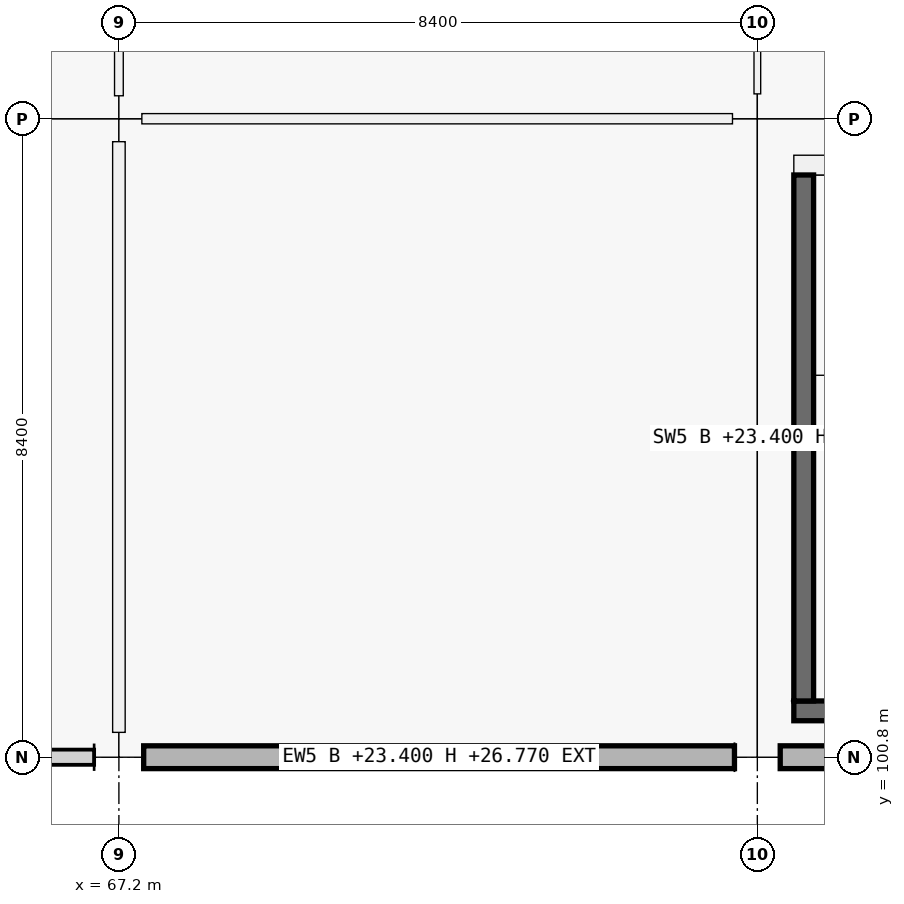
"""IFC4 building model, lengths in metres.
Left out: names, types, materials, properties, quantities, classifications, styles, units other than length and angle.
Written with IfcOpenShell. Run it as: python <this file> out.ifc"""

import sys

from ifc_helpers import new_model, si_unit, direction, frame, frame_2d, origin, origin_2d, place, context, subcontext, project, spatial, rectangle, extrude, element, fill, save


model = new_model("IFC4")
c1 = context("Model", 3, precision=1e-05, world=origin(), true_north=direction((0.0, 1.0)))
c2 = subcontext(c1, "Body", "Model", "MODEL_VIEW")
j1 = project(units=[si_unit("LENGTHUNIT", "METRE"), si_unit("PLANEANGLEUNIT", "RADIAN")], contexts=[c1])
p1 = place(None, origin())
s1 = spatial("IfcSite", under=j1, at=p1, CompositionType="ELEMENT")
p2 = place(p1, origin())
s2 = spatial("IfcBuilding", under=s1, at=p2, CompositionType="ELEMENT")
p3 = place(p2, frame((0.0, 0.0, 23.4)))
s3 = spatial("IfcBuildingStorey", under=s2, at=p3, CompositionType="ELEMENT", Elevation=23.4)
p4 = place(p3, frame((67.2, 100.8, 0.0), z_axis=(0.0, 0.0, 1.0), x_axis=(1.0, 0.0, 0.0)))
e1 = element("IfcColumn", 1, at=p4, inside=s3, PredefinedType="COLUMN", context=c2, shape_type="SweptSolid", body=[
    extrude(rectangle(XDim=0.65, YDim=0.65, at=origin_2d()), origin(), (0.0, 0.0, 1.0), 4.32),
])
for number, where, z_axis, x_axis in (
    (2, (67.2, 109.2, 0.0), (0.0, 0.0, 1.0), (1.0, 0.0, 0.0)),
    (3, (75.6, 100.8, 0.0), (0.0, 0.0, 1.0), (1.0, 0.0, 0.0)),
):
    element("IfcColumn", number, at=place(p3, frame(where, z_axis=z_axis, x_axis=x_axis)), inside=s3, PredefinedType="COLUMN", context=c2, shape_type="SweptSolid", body=[
        extrude(rectangle(XDim=0.6, YDim=0.6, at=origin_2d()), origin(), (0.0, 0.0, 1.0), 4.32),
    ])
p5 = place(p3, frame((75.6, 109.2, 0.0), z_axis=(0.0, 0.0, 1.0), x_axis=(1.0, 0.0, 0.0)))
e4 = element("IfcColumn", 4, at=p5, inside=s3, PredefinedType="COLUMN", context=c2, shape_type="SweptSolid", body=[
    extrude(rectangle(XDim=0.65, YDim=0.65, at=origin_2d()), origin(), (0.0, 0.0, 1.0), 4.32),
])
p6 = place(p3, frame((75.299, 100.8, 0.0), z_axis=(0.0, 0.0, 1.0), x_axis=(-1.0, 0.0, 0.0)))
e5 = element("IfcWall", 5, at=p6, inside=s3, PredefinedType="SOLIDWALL", context=c2, shape_type="SweptSolid", body=[
    extrude(rectangle(XDim=7.773, YDim=0.3, at=frame_2d((3.887, 0.0))), origin(), (0.0, 0.0, 1.0), 3.37),
])
p7 = place(p6, frame((2.511, 0.0, 0.9)))
e6 = element("IfcOpeningElement", 6, at=p7, cuts=e5, PredefinedType="OPENING", context=c2, shape_type="SweptSolid", body=[
    extrude(rectangle(XDim=2.75, YDim=1.6, at=frame_2d((1.375, 0.8))), frame((0.0, 0.15, 0.0), z_axis=(0.0, -1.0, 0.0), x_axis=(1.0, 0.0, 0.0)), (0.0, 0.0, 1.0), 0.3),
])
p8 = place(p3, frame((83.674, 100.8, 0.0), z_axis=(0.0, 0.0, 1.0), x_axis=(-1.0, 0.0, 0.0)))
e7 = element("IfcWall", 7, at=p8, inside=s3, PredefinedType="SOLIDWALL", context=c2, shape_type="SweptSolid", body=[
    extrude(rectangle(XDim=7.773, YDim=0.3, at=frame_2d((3.887, 0.0))), origin(), (0.0, 0.0, 1.0), 3.37),
])
p9 = place(p3, frame((83.52, 101.41, 0.0), z_axis=(0.0, 0.0, 1.0), x_axis=(-1.0, 0.0, 0.0)))
e8 = element("IfcWall", 8, at=p9, inside=s3, PredefinedType="SHEAR", context=c2, shape_type="SweptSolid", body=[
    extrude(rectangle(XDim=7.44, YDim=0.26, at=frame_2d((3.72, 0.0))), origin(), (0.0, 0.0, 1.0), 4.32),
])
p10 = place(p3, frame((76.21, 101.54, 0.0), z_axis=(0.0, 0.0, 1.0), x_axis=(0.0, 1.0, 0.0)))
e9 = element("IfcWall", 9, at=p10, inside=s3, PredefinedType="SHEAR", context=c2, shape_type="SweptSolid", body=[
    extrude(rectangle(XDim=6.92, YDim=0.26, at=frame_2d((3.46, 0.0))), origin(), (0.0, 0.0, 1.0), 4.32),
])
p11 = place(p3, frame((76.08, 108.59, 0.0), z_axis=(0.0, 0.0, 1.0), x_axis=(1.0, 0.0, 0.0)))
e10 = element("IfcWall", 10, at=p11, inside=s3, PredefinedType="SHEAR", context=c2, shape_type="SweptSolid", body=[
    extrude(rectangle(XDim=7.44, YDim=0.26, at=frame_2d((3.72, 0.0))), origin(), (0.0, 0.0, 1.0), 4.32),
])
p12 = place(p3, frame((67.502, 109.2, 0.0), z_axis=(0.0, 0.0, 1.0), x_axis=(1.0, 0.0, 0.0)))
e11 = element("IfcWall", 11, at=p12, inside=s3, PredefinedType="PARTITIONING", context=c2, shape_type="SweptSolid", body=[
    extrude(rectangle(XDim=7.771, YDim=0.135, at=frame_2d((3.885, 0.0))), origin(), (0.0, 0.0, 1.0), 3.19),
])
p13 = place(p3, frame((67.2, 101.127, 0.0), z_axis=(0.0, 0.0, 1.0), x_axis=(0.0, 1.0, 0.0)))
e12 = element("IfcWall", 12, at=p13, inside=s3, PredefinedType="PARTITIONING", context=c2, shape_type="SweptSolid", body=[
    extrude(rectangle(XDim=7.771, YDim=0.165, at=frame_2d((3.885, 0.0))), origin(), (0.0, 0.0, 1.0), 3.19),
])
p14 = place(p13, frame((3.415, 0.0, 0.0)))
e13 = element("IfcOpeningElement", 13, at=p14, cuts=e12, PredefinedType="OPENING", context=c2, shape_type="SweptSolid", body=[
    extrude(rectangle(XDim=0.94, YDim=2.15, at=frame_2d((0.47, 1.075))), frame((0.0, 0.083, 0.0), z_axis=(0.0, -1.0, 0.0), x_axis=(1.0, 0.0, 0.0)), (0.0, 0.0, 1.0), 0.165),
])
p15 = place(p3, frame((67.2, 109.502, 0.0), z_axis=(0.0, 0.0, 1.0), x_axis=(0.0, 1.0, 0.0)))
e14 = element("IfcWall", 14, at=p15, inside=s3, PredefinedType="PARTITIONING", context=c2, shape_type="SweptSolid", body=[
    extrude(rectangle(XDim=7.821, YDim=0.115, at=frame_2d((3.911, 0.0))), origin(), (0.0, 0.0, 1.0), 3.19),
])
p16 = place(p15, frame((0.693, 0.0, 0.0)))
e15 = element("IfcOpeningElement", 15, at=p16, cuts=e14, PredefinedType="OPENING", context=c2, shape_type="SweptSolid", body=[
    extrude(rectangle(XDim=0.94, YDim=2.08, at=frame_2d((0.47, 1.04))), frame((0.0, 0.058, 0.0), z_axis=(0.0, -1.0, 0.0), x_axis=(1.0, 0.0, 0.0)), (0.0, 0.0, 1.0), 0.115),
])
p17 = place(p15, frame((4.603, 0.0, 0.0)))
e16 = element("IfcOpeningElement", 16, at=p17, cuts=e14, PredefinedType="OPENING", context=c2, shape_type="SweptSolid", body=[
    extrude(rectangle(XDim=0.96, YDim=2.1, at=frame_2d((0.48, 1.05))), frame((0.0, 0.058, 0.0), z_axis=(0.0, -1.0, 0.0), x_axis=(1.0, 0.0, 0.0)), (0.0, 0.0, 1.0), 0.115),
])
p18 = place(p3, frame((75.6, 109.527, 0.0), z_axis=(0.0, 0.0, 1.0), x_axis=(0.0, 1.0, 0.0)))
e17 = element("IfcWall", 17, at=p18, inside=s3, PredefinedType="PARTITIONING", context=c2, shape_type="SweptSolid", body=[
    extrude(rectangle(XDim=7.796, YDim=0.088, at=frame_2d((3.898, 0.0))), origin(), (0.0, 0.0, 1.0), 3.19),
])
p19 = place(p7, origin())
e18 = element("IfcWindow", 18, at=p19, inside=s3, PartitioningType="SINGLE_PANEL", PredefinedType="WINDOW", context=c2, shape_type="SweptSolid", body=[
    extrude(rectangle(XDim=2.75, YDim=1.6, at=frame_2d((1.375, 0.8))), frame((0.0, 0.03, 0.0), z_axis=(0.0, -1.0, 0.0), x_axis=(1.0, 0.0, 0.0)), (0.0, 0.0, 1.0), 0.06),
])
fill(e6, e18)
p20 = place(p14, origin())
e19 = element("IfcDoor", 19, at=p20, inside=s3, OperationType="SINGLE_SWING_LEFT", PredefinedType="DOOR", context=c2, shape_type="SweptSolid", body=[
    extrude(rectangle(XDim=0.94, YDim=2.15, at=frame_2d((0.47, 1.075))), frame((0.0, 0.025, 0.0), z_axis=(0.0, -1.0, 0.0), x_axis=(1.0, 0.0, 0.0)), (0.0, 0.0, 1.0), 0.05),
])
fill(e13, e19)
save(model, sys.argv[1])
